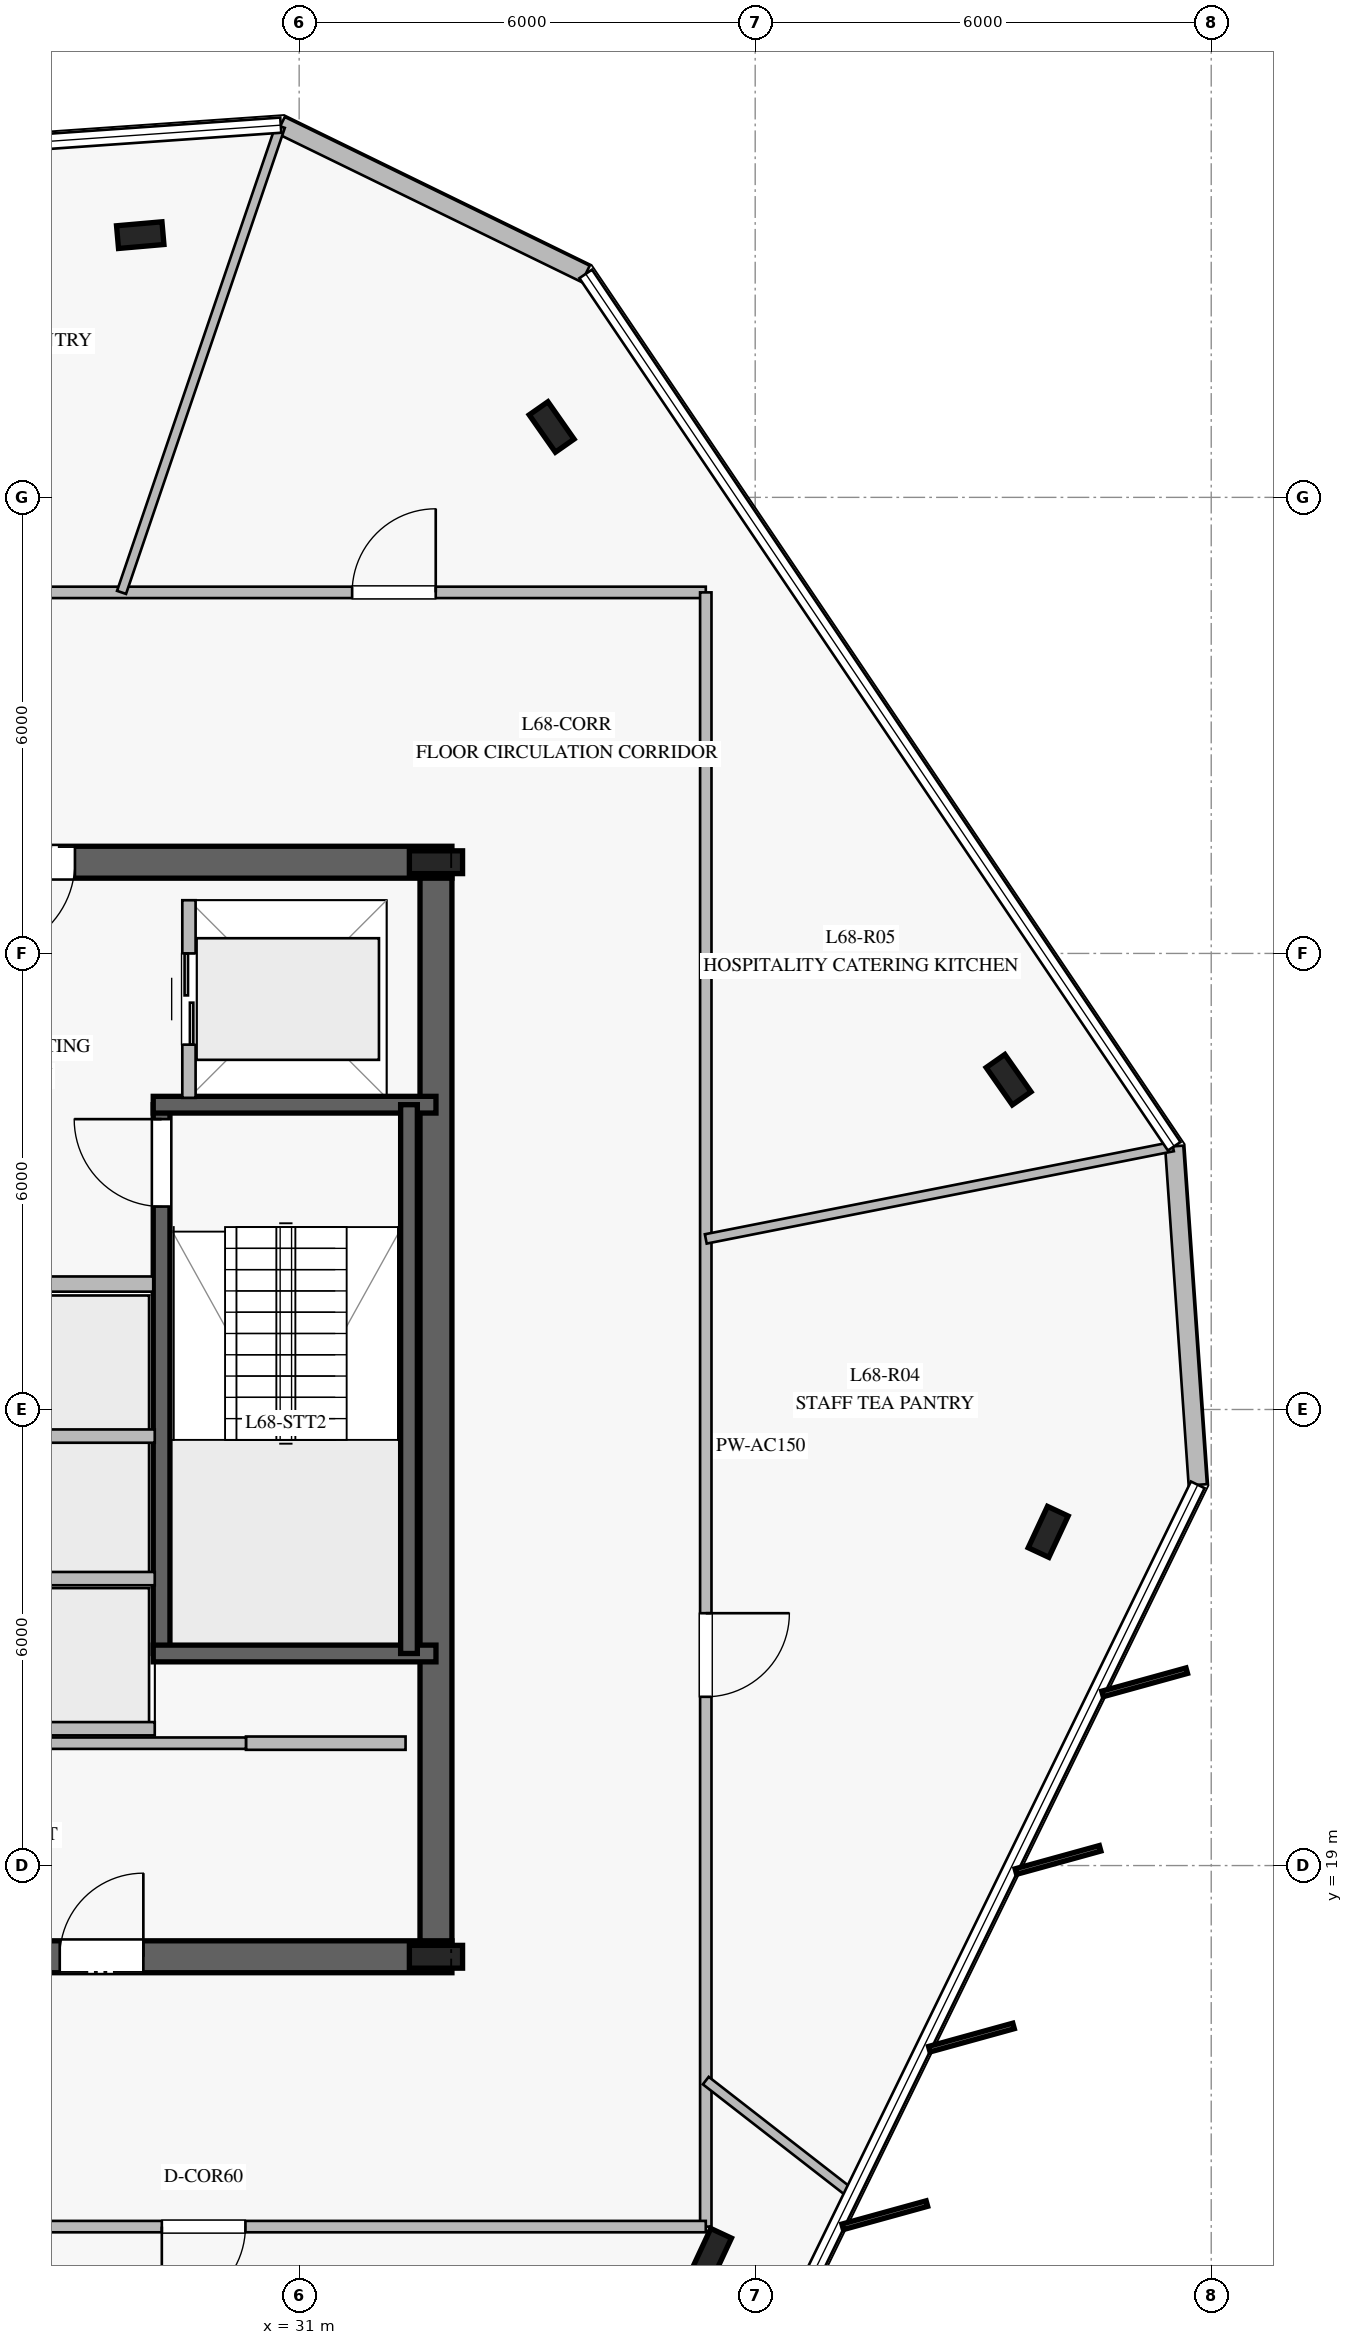
"""IFC4 building model, lengths in metres.
Left out: names, types, materials, properties, quantities, classifications, styles, units other than length and angle.
Written with IfcOpenShell. Run it as: python <this file> out.ifc"""

import sys

from ifc_helpers import new_model, si_unit, direction, frame, frame_2d, origin, origin_2d, place, context, subcontext, project, spatial, rectangle, i_section, extrude, element, fill, save


model = new_model("IFC4")
c1 = context("Model", 3, precision=1e-05, world=origin(), true_north=direction((0.0, 1.0)))
c2 = subcontext(c1, "Body", "Model", "MODEL_VIEW")
j1 = project(units=[si_unit("LENGTHUNIT", "METRE"), si_unit("PLANEANGLEUNIT", "RADIAN")], contexts=[c1])
p1 = place(None, origin())
s1 = spatial("IfcSite", under=j1, at=p1, CompositionType="ELEMENT")
p2 = place(p1, origin())
s2 = spatial("IfcBuilding", under=s1, at=p2, CompositionType="ELEMENT")
p3 = place(p2, frame((0.0, 0.0, 282.2)))
s3 = spatial("IfcBuildingStorey", under=s2, at=p3, CompositionType="ELEMENT", Elevation=282.2)
p4 = place(p3, frame((16.99, 17.8, 0.0), z_axis=(0.0, 0.0, 1.0), x_axis=(1.0, 0.0, 0.0)))
e1 = element("IfcWall", 1, at=p4, inside=s3, PredefinedType="SHEAR", context=c2, shape_type="SweptSolid", body=[
    extrude(rectangle(XDim=16.02, YDim=0.42, at=frame_2d((8.01, 0.0))), origin(), (0.0, 0.0, 1.0), 3.78),
])
p5 = place(p4, frame((4.96, 0.0, 0.0)))
e2 = element("IfcOpeningElement", 2, at=p5, cuts=e1, PredefinedType="OPENING", context=c2, shape_type="SweptSolid", body=[
    extrude(rectangle(XDim=1.2, YDim=2.25, at=frame_2d((0.6, 1.125))), frame((0.0, 0.22, 0.0), z_axis=(0.0, -1.0, 0.0), x_axis=(1.0, 0.0, 0.0)), (0.0, 0.0, 1.0), 0.44),
])
p6 = place(p4, frame((10.86, 0.0, 0.0)))
e3 = element("IfcOpeningElement", 3, at=p6, cuts=e1, PredefinedType="OPENING", context=c2, shape_type="SweptSolid", body=[
    extrude(rectangle(XDim=1.1, YDim=2.2, at=frame_2d((0.55, 1.1))), frame((0.0, 0.22, 0.0), z_axis=(0.0, -1.0, 0.0), x_axis=(1.0, 0.0, 0.0)), (0.0, 0.0, 1.0), 0.44),
])
p7 = place(p3, frame((33.01, 32.2, 0.0), z_axis=(0.0, 0.0, 1.0), x_axis=(-1.0, 0.0, 0.0)))
e4 = element("IfcWall", 4, at=p7, inside=s3, PredefinedType="SHEAR", context=c2, shape_type="SweptSolid", body=[
    extrude(rectangle(XDim=16.02, YDim=0.42, at=frame_2d((8.01, 0.0))), origin(), (0.0, 0.0, 1.0), 3.78),
])
p8 = place(p7, frame((4.96, 0.0, 0.0)))
e5 = element("IfcOpeningElement", 5, at=p8, cuts=e4, PredefinedType="OPENING", context=c2, shape_type="SweptSolid", body=[
    extrude(rectangle(XDim=1.2, YDim=2.25, at=frame_2d((0.6, 1.125))), frame((0.0, 0.22, 0.0), z_axis=(0.0, -1.0, 0.0), x_axis=(1.0, 0.0, 0.0)), (0.0, 0.0, 1.0), 0.44),
])
p9 = place(p7, frame((9.785, 0.0, 0.0)))
e6 = element("IfcOpeningElement", 6, at=p9, cuts=e4, PredefinedType="OPENING", context=c2, shape_type="SweptSolid", body=[
    extrude(rectangle(XDim=1.1, YDim=2.2, at=frame_2d((0.55, 1.1))), frame((0.0, 0.22, 0.0), z_axis=(0.0, -1.0, 0.0), x_axis=(1.0, 0.0, 0.0)), (0.0, 0.0, 1.0), 0.44),
])
p10 = place(p3, frame((32.8, 18.01, 0.0), z_axis=(0.0, 0.0, 1.0), x_axis=(0.0, 1.0, 0.0)))
e7 = element("IfcWall", 7, at=p10, inside=s3, PredefinedType="SHEAR", context=c2, shape_type="SweptSolid", body=[
    extrude(rectangle(XDim=13.98, YDim=0.42, at=frame_2d((6.99, 0.0))), origin(), (0.0, 0.0, 1.0), 3.78),
])
for number, where, z_axis, x_axis in (
    (8, (32.8, 17.8, 0.0), (0.0, 0.0, 1.0), (1.0, 0.0, 0.0)),
    (9, (32.8, 32.2, 0.0), (0.0, 0.0, 1.0), (1.0, 0.0, 0.0)),
):
    element("IfcColumn", number, at=place(p3, frame(where, z_axis=z_axis, x_axis=x_axis)), inside=s3, PredefinedType="COLUMN", context=c2, shape_type="SweptSolid", body=[
        extrude(i_section(OverallWidth=0.3, OverallDepth=0.7, WebThickness=0.017, FlangeThickness=0.032, at=origin_2d()), origin(), (0.0, 0.0, 1.0), 4.0),
    ])
p11 = place(p3, frame((29.19, 21.79, 0.0), z_axis=(0.0, 0.0, 1.0), x_axis=(0.0, 1.0, 0.0)))
e10 = element("IfcWall", 10, at=p11, inside=s3, PredefinedType="SOLIDWALL", context=c2, shape_type="SweptSolid", body=[
    extrude(rectangle(XDim=7.22, YDim=0.22, at=frame_2d((3.61, 0.0))), origin(), (0.0, 0.0, 1.0), 3.78),
])
p12 = place(p11, frame((5.88, 0.0, 0.0)))
e11 = element("IfcOpeningElement", 11, at=p12, cuts=e10, PredefinedType="OPENING", context=c2, shape_type="SweptSolid", body=[
    extrude(rectangle(XDim=1.15, YDim=2.2, at=frame_2d((0.575, 1.1))), frame((0.0, 0.12, 0.0), z_axis=(0.0, -1.0, 0.0), x_axis=(1.0, 0.0, 0.0)), (0.0, 0.0, 1.0), 0.24),
])
for number, where, z_axis, x_axis in (
    (12, (29.08, 21.79, 0.0), (0.0, 0.0, 1.0), (1.0, 0.0, 0.0)),
    (13, (29.08, 29.01, 0.0), (0.0, 0.0, 1.0), (1.0, 0.0, 0.0)),
):
    element("IfcWall", number, at=place(p3, frame(where, z_axis=z_axis, x_axis=x_axis)), inside=s3, PredefinedType="SOLIDWALL", context=c2, shape_type="SweptSolid", body=[
        extrude(rectangle(XDim=3.72, YDim=0.22, at=frame_2d((1.86, 0.0))), origin(), (0.0, 0.0, 1.0), 3.78),
    ])
p13 = place(p3, frame((32.445, 29.01, 0.0), z_axis=(0.0, 0.0, 1.0), x_axis=(0.0, -1.0, 0.0)))
e14 = element("IfcWall", 14, at=p13, inside=s3, PredefinedType="SOLIDWALL", context=c2, shape_type="SweptSolid", body=[
    extrude(rectangle(XDim=7.22, YDim=0.22, at=frame_2d((3.61, 0.0))), origin(), (0.0, 0.0, 1.0), 3.78),
])
for number, where, z_axis, x_axis in (
    (15, (28.909, 40.45, 0.0), (0.0, 0.0, 1.0), (0.996, 0.087, 0.0)),
    (16, (36.425, 13.89, 0.0), (0.0, 0.0, 1.0), (0.423, 0.906, 0.0)),
    (17, (40.855, 23.39, 0.0), (0.0, 0.0, 1.0), (0.423, 0.906, 0.0)),
    (18, (40.334, 29.339, 0.0), (0.0, 0.0, 1.0), (-0.574, 0.819, 0.0)),
    (19, (34.322, 37.926, 0.0), (0.0, 0.0, 1.0), (-0.574, 0.819, 0.0)),
):
    element("IfcColumn", number, at=place(p3, frame(where, z_axis=z_axis, x_axis=x_axis)), inside=s3, PredefinedType="COLUMN", context=c2, shape_type="SweptSolid", body=[
        extrude(i_section(OverallWidth=0.3, OverallDepth=0.6, WebThickness=0.015, FlangeThickness=0.03, at=origin_2d()), origin(), (0.0, 0.0, 1.0), 4.0),
    ])
p14 = place(p3, frame((42.823, 24.009, 0.0), z_axis=(0.0, 0.0, 1.0), x_axis=(-0.069447662525, 0.997585596413, 0.0)))
e20 = element("IfcWall", 20, at=p14, inside=s3, PredefinedType="STANDARD", context=c2, shape_type="SweptSolid", body=[
    extrude(rectangle(XDim=4.465, YDim=0.24, at=frame_2d((2.232, 0.0))), origin(), (0.0, 0.0, 1.0), 3.78),
])
p15 = place(p3, frame((34.77, 39.94, 0.0), z_axis=(0.0, 0.0, 1.0), x_axis=(-0.898770548201, 0.438419321754, 0.0)))
e21 = element("IfcWall", 21, at=p15, inside=s3, PredefinedType="STANDARD", context=c2, shape_type="SweptSolid", body=[
    extrude(rectangle(XDim=4.464, YDim=0.24, at=frame_2d((2.232, 0.0))), origin(), (0.0, 0.0, 1.0), 3.78),
])
p16 = place(p3, frame((25.7, 26.65, 0.0), z_axis=(0.0, 0.0, 1.0), x_axis=(1.0, 0.0, 0.0)))
e22 = element("IfcWall", 22, at=p16, inside=s3, PredefinedType="PARTITIONING", context=c2, shape_type="SweptSolid", body=[
    extrude(rectangle(XDim=3.38, YDim=0.2, at=frame_2d((1.69, 0.0))), origin(), (0.0, 0.0, 1.0), 3.78),
])
p17 = place(p3, frame((30.3, 20.61, 0.0), z_axis=(0.0, 0.0, 1.0), x_axis=(1.0, 0.0, 0.0)))
e23 = element("IfcWall", 23, at=p17, inside=s3, PredefinedType="PARTITIONING", context=c2, shape_type="SweptSolid", body=[
    extrude(rectangle(XDim=2.1, YDim=0.175, at=frame_2d((1.05, 0.0))), origin(), (0.0, 0.0, 1.0), 3.78),
])
p18 = place(p3, frame((24.4, 20.61, 0.0), z_axis=(0.0, 0.0, 1.0), x_axis=(1.0, 0.0, 0.0)))
e24 = element("IfcWall", 24, at=p18, inside=s3, PredefinedType="PARTITIONING", context=c2, shape_type="SweptSolid", body=[
    extrude(rectangle(XDim=5.9, YDim=0.15, at=frame_2d((2.95, 0.0))), origin(), (0.0, 0.0, 1.0), 3.78),
])
for number, where, z_axis, x_axis in (
    (25, (26.75, 20.8, 0.0), (0.0, 0.0, 1.0), (1.0, 0.0, 0.0)),
    (26, (26.75, 22.775, 0.0), (0.0, 0.0, 1.0), (1.0, 0.0, 0.0)),
    (27, (26.75, 24.65, 0.0), (0.0, 0.0, 1.0), (1.0, 0.0, 0.0)),
):
    element("IfcWall", number, at=place(p3, frame(where, z_axis=z_axis, x_axis=x_axis)), inside=s3, PredefinedType="PARTITIONING", context=c2, shape_type="SweptSolid", body=[
        extrude(rectangle(XDim=2.35, YDim=0.175, at=frame_2d((1.175, 0.0))), origin(), (0.0, 0.0, 1.0), 3.78),
    ])
p19 = place(p3, frame((29.55, 29.1, 0.0), z_axis=(0.0, 0.0, 1.0), x_axis=(0.0, 1.0, 0.0)))
e28 = element("IfcWall", 28, at=p19, inside=s3, PredefinedType="PARTITIONING", context=c2, shape_type="SweptSolid", body=[
    extrude(rectangle(XDim=2.6, YDim=0.175, at=frame_2d((1.3, 0.0))), origin(), (0.0, 0.0, 1.0), 3.78),
])
p20 = place(p19, frame((0.7, 0.0, 0.0)))
e29 = element("IfcOpeningElement", 29, at=p20, cuts=e28, PredefinedType="OPENING", context=c2, shape_type="SweptSolid", body=[
    extrude(rectangle(XDim=1.2, YDim=2.2, at=frame_2d((0.6, 1.1))), frame((0.0, 0.098, 0.0), z_axis=(0.0, -1.0, 0.0), x_axis=(1.0, 0.0, 0.0)), (0.0, 0.0, 1.0), 0.195),
])
p21 = place(p3, frame((13.65, 35.75, 0.0), z_axis=(0.0, 0.0, 1.0), x_axis=(1.0, 0.0, 0.0)))
e30 = element("IfcWall", 30, at=p21, inside=s3, PredefinedType="PARTITIONING", context=c2, shape_type="SweptSolid", body=[
    extrude(rectangle(XDim=22.7, YDim=0.15, at=frame_2d((11.35, 0.0))), origin(), (0.0, 0.0, 1.0), 3.28),
])
p22 = place(p21, frame((18.047, 0.0, 0.0)))
e31 = element("IfcOpeningElement", 31, at=p22, cuts=e30, PredefinedType="OPENING", context=c2, shape_type="SweptSolid", body=[
    extrude(rectangle(XDim=1.1, YDim=2.2, at=frame_2d((0.55, 1.1))), frame((0.0, 0.085, 0.0), z_axis=(0.0, -1.0, 0.0), x_axis=(1.0, 0.0, 0.0)), (0.0, 0.0, 1.0), 0.17),
])
p23 = place(p21, frame((11.104, 0.0, 0.0)))
e32 = element("IfcOpeningElement", 32, at=p23, cuts=e30, PredefinedType="OPENING", context=c2, shape_type="SweptSolid", body=[
    extrude(rectangle(XDim=1.1, YDim=2.2, at=frame_2d((0.55, 1.1))), frame((0.0, 0.085, 0.0), z_axis=(0.0, -1.0, 0.0), x_axis=(1.0, 0.0, 0.0)), (0.0, 0.0, 1.0), 0.17),
])
p24 = place(p21, frame((3.681, 0.0, 0.0)))
e33 = element("IfcOpeningElement", 33, at=p24, cuts=e30, PredefinedType="OPENING", context=c2, shape_type="SweptSolid", body=[
    extrude(rectangle(XDim=1.1, YDim=2.2, at=frame_2d((0.55, 1.1))), frame((0.0, 0.085, 0.0), z_axis=(0.0, -1.0, 0.0), x_axis=(1.0, 0.0, 0.0)), (0.0, 0.0, 1.0), 0.17),
])
p25 = place(p3, frame((36.35, 35.75, 0.0), z_axis=(0.0, 0.0, 1.0), x_axis=(0.0, -1.0, 0.0)))
e34 = element("IfcWall", 34, at=p25, inside=s3, PredefinedType="PARTITIONING", context=c2, shape_type="SweptSolid", body=[
    extrude(rectangle(XDim=21.5, YDim=0.15, at=frame_2d((10.75, 0.0))), origin(), (0.0, 0.0, 1.0), 3.05),
])
p26 = place(p25, frame((13.43, 0.0, 0.0)))
e35 = element("IfcOpeningElement", 35, at=p26, cuts=e34, PredefinedType="OPENING", context=c2, shape_type="SweptSolid", body=[
    extrude(rectangle(XDim=1.1, YDim=2.2, at=frame_2d((0.55, 1.1))), frame((0.0, 0.085, 0.0), z_axis=(0.0, -1.0, 0.0), x_axis=(1.0, 0.0, 0.0)), (0.0, 0.0, 1.0), 0.17),
])
p27 = place(p3, frame((36.35, 14.25, 0.0), z_axis=(0.0, 0.0, 1.0), x_axis=(-1.0, 0.0, 0.0)))
e36 = element("IfcWall", 36, at=p27, inside=s3, PredefinedType="PARTITIONING", context=c2, shape_type="SweptSolid", body=[
    extrude(rectangle(XDim=22.7, YDim=0.15, at=frame_2d((11.35, 0.0))), origin(), (0.0, 0.0, 1.0), 3.28),
])
p28 = place(p27, frame((16.95, 0.0, 0.0)))
e37 = element("IfcOpeningElement", 37, at=p28, cuts=e36, PredefinedType="OPENING", context=c2, shape_type="SweptSolid", body=[
    extrude(rectangle(XDim=1.1, YDim=2.2, at=frame_2d((0.55, 1.1))), frame((0.0, 0.085, 0.0), z_axis=(0.0, -1.0, 0.0), x_axis=(1.0, 0.0, 0.0)), (0.0, 0.0, 1.0), 0.17),
])
p29 = place(p27, frame((6.057, 0.0, 0.0)))
e38 = element("IfcOpeningElement", 38, at=p29, cuts=e36, PredefinedType="OPENING", context=c2, shape_type="SweptSolid", body=[
    extrude(rectangle(XDim=1.1, YDim=2.2, at=frame_2d((0.55, 1.1))), frame((0.0, 0.085, 0.0), z_axis=(0.0, -1.0, 0.0), x_axis=(1.0, 0.0, 0.0)), (0.0, 0.0, 1.0), 0.17),
])
p30 = place(p3, frame((36.35, 16.171, 0.0), z_axis=(0.0, 0.0, 1.0), x_axis=(0.78932503786, -0.613975557011, 0.0)))
e39 = element("IfcWall", 39, at=p30, inside=s3, PredefinedType="PARTITIONING", context=c2, shape_type="SweptSolid", body=[
    extrude(rectangle(XDim=2.418, YDim=0.125, at=frame_2d((1.209, 0.0))), origin(), (0.0, 0.0, 1.0), 3.28),
])
p31 = place(p3, frame((36.35, 27.244, 0.0), z_axis=(0.0, 0.0, 1.0), x_axis=(0.981011441918, 0.193949866784, 0.0)))
e40 = element("IfcWall", 40, at=p31, inside=s3, PredefinedType="PARTITIONING", context=c2, shape_type="SweptSolid", body=[
    extrude(rectangle(XDim=6.265, YDim=0.125, at=frame_2d((3.132, 0.0))), origin(), (0.0, 0.0, 1.0), 3.28),
])
p32 = place(p3, frame((28.663, 35.75, 0.0), z_axis=(0.0, 0.0, 1.0), x_axis=(0.322496640265, 0.946570608575, 0.0)))
e41 = element("IfcWall", 41, at=p32, inside=s3, PredefinedType="PARTITIONING", context=c2, shape_type="SweptSolid", body=[
    extrude(rectangle(XDim=6.477, YDim=0.125, at=frame_2d((3.239, 0.0))), origin(), (0.0, 0.0, 1.0), 3.28),
])
p33 = place(p12, origin())
e42 = element("IfcDoor", 42, at=p33, inside=s3, OperationType="SINGLE_SWING_RIGHT", PredefinedType="DOOR", context=c2, shape_type="SweptSolid", body=[
    extrude(rectangle(XDim=1.15, YDim=2.2, at=frame_2d((0.575, 1.1))), frame((0.0, 0.025, 0.0), z_axis=(0.0, -1.0, 0.0), x_axis=(1.0, 0.0, 0.0)), (0.0, 0.0, 1.0), 0.05),
])
fill(e11, e42)
p34 = place(p8, origin())
e43 = element("IfcDoor", 43, at=p34, inside=s3, OperationType="SINGLE_SWING_RIGHT", PredefinedType="DOOR", context=c2, shape_type="SweptSolid", body=[
    extrude(rectangle(XDim=1.2, YDim=2.25, at=frame_2d((0.6, 1.125))), frame((0.0, 0.025, 0.0), z_axis=(0.0, -1.0, 0.0), x_axis=(1.0, 0.0, 0.0)), (0.0, 0.0, 1.0), 0.05),
])
fill(e5, e43)
p35 = place(p6, origin())
e44 = element("IfcDoor", 44, at=p35, inside=s3, OperationType="SINGLE_SWING_RIGHT", PredefinedType="DOOR", context=c2, shape_type="SweptSolid", body=[
    extrude(rectangle(XDim=1.1, YDim=2.2, at=frame_2d((0.55, 1.1))), frame((0.0, 0.025, 0.0), z_axis=(0.0, -1.0, 0.0), x_axis=(1.0, 0.0, 0.0)), (0.0, 0.0, 1.0), 0.05),
])
fill(e3, e44)
p36 = place(p20, origin())
e45 = element("IfcDoor", 45, at=p36, inside=s3, OperationType="DOUBLE_DOOR_SLIDING", PredefinedType="DOOR", context=c2, shape_type="SweptSolid", body=[
    extrude(rectangle(XDim=1.2, YDim=2.2, at=frame_2d((0.6, 1.1))), frame((0.0, 0.025, 0.0), z_axis=(0.0, -1.0, 0.0), x_axis=(1.0, 0.0, 0.0)), (0.0, 0.0, 1.0), 0.05),
])
fill(e29, e45)
p37 = place(p29, origin())
e46 = element("IfcDoor", 46, at=p37, inside=s3, OperationType="SINGLE_SWING_RIGHT", PredefinedType="DOOR", context=c2, shape_type="SweptSolid", body=[
    extrude(rectangle(XDim=1.1, YDim=2.2, at=frame_2d((0.55, 1.1))), frame((0.0, 0.025, 0.0), z_axis=(0.0, -1.0, 0.0), x_axis=(1.0, 0.0, 0.0)), (0.0, 0.0, 1.0), 0.05),
])
fill(e38, e46)
p38 = place(p26, origin())
e47 = element("IfcDoor", 47, at=p38, inside=s3, OperationType="SINGLE_SWING_LEFT", PredefinedType="DOOR", context=c2, shape_type="SweptSolid", body=[
    extrude(rectangle(XDim=1.1, YDim=2.2, at=frame_2d((0.55, 1.1))), frame((0.0, 0.025, 0.0), z_axis=(0.0, -1.0, 0.0), x_axis=(1.0, 0.0, 0.0)), (0.0, 0.0, 1.0), 0.05),
])
fill(e35, e47)
p39 = place(p22, origin())
e48 = element("IfcDoor", 48, at=p39, inside=s3, OperationType="SINGLE_SWING_RIGHT", PredefinedType="DOOR", context=c2, shape_type="SweptSolid", body=[
    extrude(rectangle(XDim=1.1, YDim=2.2, at=frame_2d((0.55, 1.1))), frame((0.0, 0.025, 0.0), z_axis=(0.0, -1.0, 0.0), x_axis=(1.0, 0.0, 0.0)), (0.0, 0.0, 1.0), 0.05),
])
fill(e31, e48)
save(model, sys.argv[1])
